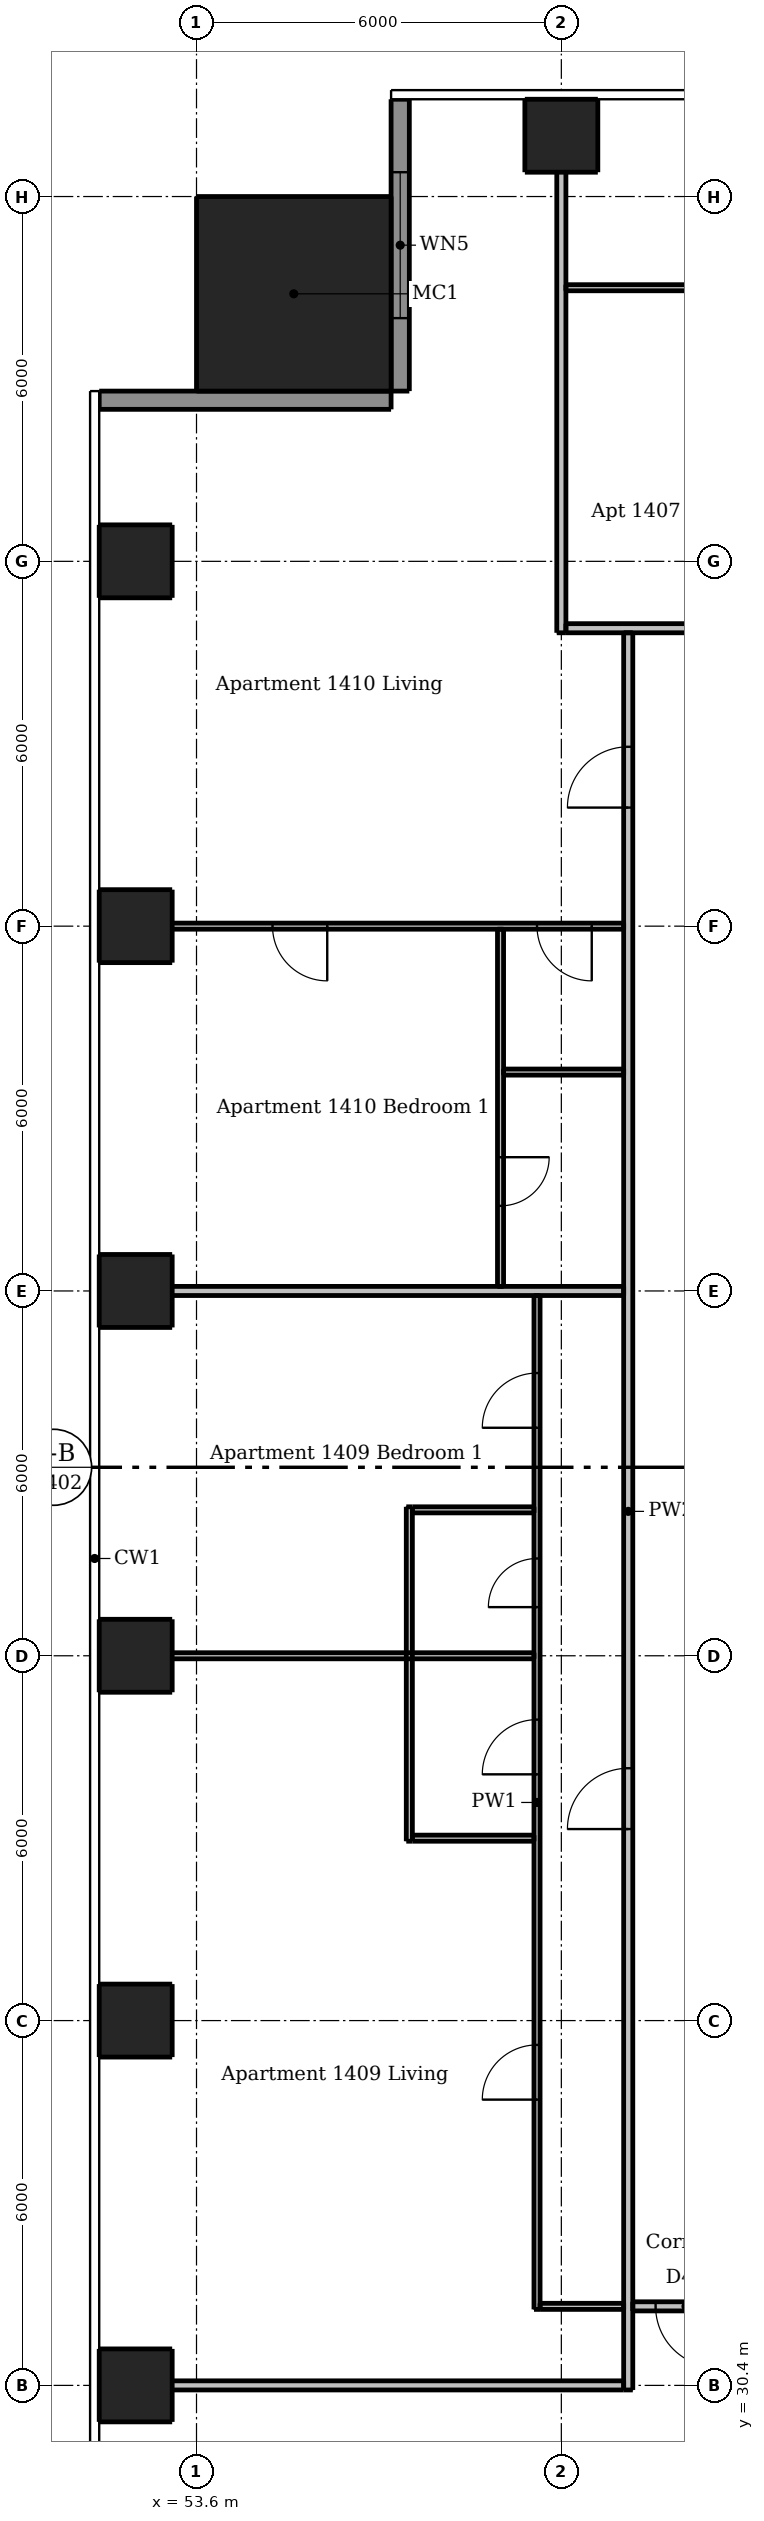
"""IFC4 building model, lengths in metres.
Left out: names, types, materials, properties, quantities, classifications, styles, units other than length and angle.
Written with IfcOpenShell. Run it as: python <this file> out.ifc"""

import sys

from ifc_helpers import new_model, si_unit, direction, frame, frame_2d, origin, origin_2d, place, context, subcontext, project, spatial, rectangle, extrude, element, fill, save


model = new_model("IFC4")
c1 = context("Model", 3, precision=1e-05, world=origin(), true_north=direction((0.0, 1.0)))
c2 = subcontext(c1, "Body", "Model", "MODEL_VIEW")
j1 = project(units=[si_unit("LENGTHUNIT", "METRE"), si_unit("PLANEANGLEUNIT", "RADIAN")], contexts=[c1])
p1 = place(None, origin())
s1 = spatial("IfcSite", under=j1, at=p1, CompositionType="ELEMENT")
p2 = place(p1, origin())
s2 = spatial("IfcBuilding", under=s1, at=p2, CompositionType="ELEMENT")
p3 = place(p2, frame((0.0, 0.0, 53.2)))
s3 = spatial("IfcBuildingStorey", under=s2, at=p3, CompositionType="ELEMENT", Elevation=53.2)
for number, where, z_axis, x_axis in (
    (1, (59.6, 67.4, 0.0), (0.0, 0.0, 1.0), (1.0, 0.0, 0.0)),
    (2, (52.6, 30.4, 0.0), (0.0, 0.0, 1.0), (1.0, 0.0, 0.0)),
    (3, (52.6, 36.4, 0.0), (0.0, 0.0, 1.0), (1.0, 0.0, 0.0)),
    (4, (52.6, 42.4, 0.0), (0.0, 0.0, 1.0), (1.0, 0.0, 0.0)),
    (5, (52.6, 48.4, 0.0), (0.0, 0.0, 1.0), (1.0, 0.0, 0.0)),
    (6, (52.6, 54.4, 0.0), (0.0, 0.0, 1.0), (1.0, 0.0, 0.0)),
    (7, (52.6, 60.4, 0.0), (0.0, 0.0, 1.0), (1.0, 0.0, 0.0)),
):
    element("IfcColumn", number, at=place(p3, frame(where, z_axis=z_axis, x_axis=x_axis)), inside=s3, PredefinedType="COLUMN", context=c2, shape_type="SweptSolid", body=[
        extrude(rectangle(XDim=1.2, YDim=1.2, at=origin_2d()), origin(), (0.0, 0.0, 1.0), 3.05),
    ])
p4 = place(p3, frame((55.2, 64.8, 0.0), z_axis=(0.0, 0.0, 1.0), x_axis=(1.0, 0.0, 0.0)))
e8 = element("IfcColumn", 8, at=p4, inside=s3, PredefinedType="COLUMN", context=c2, shape_type="SweptSolid", body=[
    extrude(rectangle(XDim=3.2, YDim=3.2, at=origin_2d()), origin(), (0.0, 0.0, 1.0), 3.3),
])
p5 = place(p3, frame((56.95, 68.0, 0.0), z_axis=(0.0, 0.0, 1.0), x_axis=(0.0, -1.0, 0.0)))
e9 = element("IfcWall", 9, at=p5, inside=s3, PredefinedType="SOLIDWALL", context=c2, shape_type="SweptSolid", body=[
    extrude(rectangle(XDim=4.8, YDim=0.3, at=frame_2d((2.4, 0.0))), origin(), (0.0, 0.0, 1.0), 3.05),
])
p6 = place(p5, frame((1.2, 0.0, 0.15)))
e10 = element("IfcOpeningElement", 10, at=p6, cuts=e9, PredefinedType="OPENING", context=c2, shape_type="SweptSolid", body=[
    extrude(rectangle(XDim=2.4, YDim=2.1, at=frame_2d((1.2, 1.05))), frame((0.0, 0.16, 0.0), z_axis=(0.0, -1.0, 0.0), x_axis=(1.0, 0.0, 0.0)), (0.0, 0.0, 1.0), 0.32),
])
p7 = place(p3, frame((56.8, 63.05, 0.0), z_axis=(0.0, 0.0, 1.0), x_axis=(-1.0, 0.0, 0.0)))
e11 = element("IfcWall", 11, at=p7, inside=s3, PredefinedType="SOLIDWALL", context=c2, shape_type="SweptSolid", body=[
    extrude(rectangle(XDim=4.8, YDim=0.3, at=frame_2d((2.4, 0.0))), origin(), (0.0, 0.0, 1.0), 3.05),
])
p8 = place(p3, frame((57.1, 39.35, 0.0), z_axis=(0.0, 0.0, 1.0), x_axis=(0.0, 1.0, 0.0)))
e12 = element("IfcWall", 12, at=p8, inside=s3, PredefinedType="PARTITIONING", context=c2, shape_type="SweptSolid", body=[
    extrude(rectangle(XDim=5.5, YDim=0.1, at=frame_2d((2.75, 0.0))), origin(), (0.0, 0.0, 1.0), 3.05),
])
p9 = place(p3, frame((58.6, 54.35, 0.0), z_axis=(0.0, 0.0, 1.0), x_axis=(0.0, -1.0, 0.0)))
e13 = element("IfcWall", 13, at=p9, inside=s3, PredefinedType="PARTITIONING", context=c2, shape_type="SweptSolid", body=[
    extrude(rectangle(XDim=5.875, YDim=0.1, at=frame_2d((2.938, 0.0))), origin(), (0.0, 0.0, 1.0), 3.05),
])
p10 = place(p9, frame((3.75, 0.0, 0.0)))
e14 = element("IfcOpeningElement", 14, at=p10, cuts=e13, PredefinedType="OPENING", context=c2, shape_type="SweptSolid", body=[
    extrude(rectangle(XDim=0.8, YDim=2.1, at=frame_2d((0.4, 1.05))), frame((0.0, 0.06, 0.0), z_axis=(0.0, -1.0, 0.0), x_axis=(1.0, 0.0, 0.0)), (0.0, 0.0, 1.0), 0.12),
])
p11 = place(p3, frame((59.2, 31.65, 0.0), z_axis=(0.0, 0.0, 1.0), x_axis=(0.0, 1.0, 0.0)))
e15 = element("IfcWall", 15, at=p11, inside=s3, PredefinedType="PARTITIONING", context=c2, shape_type="SweptSolid", body=[
    extrude(rectangle(XDim=16.675, YDim=0.1, at=frame_2d((8.337, 0.0))), origin(), (0.0, 0.0, 1.0), 3.05),
])
p12 = place(p11, frame((3.45, 0.0, 0.0)))
e16 = element("IfcOpeningElement", 16, at=p12, cuts=e15, PredefinedType="OPENING", context=c2, shape_type="SweptSolid", body=[
    extrude(rectangle(XDim=0.9, YDim=2.1, at=frame_2d((0.45, 1.05))), frame((0.0, 0.06, 0.0), z_axis=(0.0, -1.0, 0.0), x_axis=(1.0, 0.0, 0.0)), (0.0, 0.0, 1.0), 0.12),
])
p13 = place(p11, frame((8.8, 0.0, 0.0)))
e17 = element("IfcOpeningElement", 17, at=p13, cuts=e15, PredefinedType="OPENING", context=c2, shape_type="SweptSolid", body=[
    extrude(rectangle(XDim=0.9, YDim=2.1, at=frame_2d((0.45, 1.05))), frame((0.0, 0.06, 0.0), z_axis=(0.0, -1.0, 0.0), x_axis=(1.0, 0.0, 0.0)), (0.0, 0.0, 1.0), 0.12),
])
p14 = place(p11, frame((14.5, 0.0, 0.0)))
e18 = element("IfcOpeningElement", 18, at=p14, cuts=e15, PredefinedType="OPENING", context=c2, shape_type="SweptSolid", body=[
    extrude(rectangle(XDim=0.9, YDim=2.1, at=frame_2d((0.45, 1.05))), frame((0.0, 0.06, 0.0), z_axis=(0.0, -1.0, 0.0), x_axis=(1.0, 0.0, 0.0)), (0.0, 0.0, 1.0), 0.12),
])
p15 = place(p11, frame((11.55, 0.0, 0.0)))
e19 = element("IfcOpeningElement", 19, at=p15, cuts=e15, PredefinedType="OPENING", context=c2, shape_type="SweptSolid", body=[
    extrude(rectangle(XDim=0.8, YDim=2.1, at=frame_2d((0.4, 1.05))), frame((0.0, 0.06, 0.0), z_axis=(0.0, -1.0, 0.0), x_axis=(1.0, 0.0, 0.0)), (0.0, 0.0, 1.0), 0.12),
])
p16 = place(p3, frame((59.675, 64.9, 0.0), z_axis=(0.0, 0.0, 1.0), x_axis=(1.0, 0.0, 0.0)))
e20 = element("IfcWall", 20, at=p16, inside=s3, PredefinedType="PARTITIONING", context=c2, shape_type="SweptSolid", body=[
    extrude(rectangle(XDim=2.875, YDim=0.1, at=frame_2d((1.438, 0.0))), origin(), (0.0, 0.0, 1.0), 3.05),
])
p17 = place(p3, frame((60.625, 54.4, 0.0), z_axis=(0.0, 0.0, 1.0), x_axis=(-1.0, 0.0, 0.0)))
e21 = element("IfcWall", 21, at=p17, inside=s3, PredefinedType="PARTITIONING", context=c2, shape_type="SweptSolid", body=[
    extrude(rectangle(XDim=8.625, YDim=0.1, at=frame_2d((4.312, 0.0))), origin(), (0.0, 0.0, 1.0), 2.516),
])
p18 = place(p17, frame((0.525, 0.0, 0.0)))
e22 = element("IfcOpeningElement", 22, at=p18, cuts=e21, PredefinedType="OPENING", context=c2, shape_type="SweptSolid", body=[
    extrude(rectangle(XDim=0.9, YDim=2.1, at=frame_2d((0.45, 1.05))), frame((0.0, 0.06, 0.0), z_axis=(0.0, -1.0, 0.0), x_axis=(1.0, 0.0, 0.0)), (0.0, 0.0, 1.0), 0.12),
])
p19 = place(p17, frame((4.875, 0.0, 0.0)))
e23 = element("IfcOpeningElement", 23, at=p19, cuts=e21, PredefinedType="OPENING", context=c2, shape_type="SweptSolid", body=[
    extrude(rectangle(XDim=0.9, YDim=2.1, at=frame_2d((0.45, 1.05))), frame((0.0, 0.06, 0.0), z_axis=(0.0, -1.0, 0.0), x_axis=(1.0, 0.0, 0.0)), (0.0, 0.0, 1.0), 0.12),
])
p20 = place(p3, frame((58.65, 52.0, 0.0), z_axis=(0.0, 0.0, 1.0), x_axis=(1.0, 0.0, 0.0)))
e24 = element("IfcWall", 24, at=p20, inside=s3, PredefinedType="PARTITIONING", context=c2, shape_type="SweptSolid", body=[
    extrude(rectangle(XDim=1.975, YDim=0.1, at=frame_2d((0.988, 0.0))), origin(), (0.0, 0.0, 1.0), 3.05),
])
p21 = place(p3, frame((57.15, 44.8, 0.0), z_axis=(0.0, 0.0, 1.0), x_axis=(1.0, 0.0, 0.0)))
e25 = element("IfcWall", 25, at=p21, inside=s3, PredefinedType="PARTITIONING", context=c2, shape_type="SweptSolid", body=[
    extrude(rectangle(XDim=2.0, YDim=0.1, at=frame_2d((1.0, 0.0))), origin(), (0.0, 0.0, 1.0), 3.05),
])
p22 = place(p3, frame((52.0, 42.4, 0.0), z_axis=(0.0, 0.0, 1.0), x_axis=(1.0, 0.0, 0.0)))
e26 = element("IfcWall", 26, at=p22, inside=s3, PredefinedType="PARTITIONING", context=c2, shape_type="SweptSolid", body=[
    extrude(rectangle(XDim=7.15, YDim=0.1, at=frame_2d((3.575, 0.0))), origin(), (0.0, 0.0, 1.0), 2.516),
])
p23 = place(p3, frame((57.15, 39.4, 0.0), z_axis=(0.0, 0.0, 1.0), x_axis=(1.0, 0.0, 0.0)))
e27 = element("IfcWall", 27, at=p23, inside=s3, PredefinedType="PARTITIONING", context=c2, shape_type="SweptSolid", body=[
    extrude(rectangle(XDim=2.0, YDim=0.1, at=frame_2d((1.0, 0.0))), origin(), (0.0, 0.0, 1.0), 3.05),
])
p24 = place(p3, frame((59.25, 31.7, 0.0), z_axis=(0.0, 0.0, 1.0), x_axis=(1.0, 0.0, 0.0)))
e28 = element("IfcWall", 28, at=p24, inside=s3, PredefinedType="PARTITIONING", context=c2, shape_type="SweptSolid", body=[
    extrude(rectangle(XDim=1.375, YDim=0.1, at=frame_2d((0.688, 0.0))), origin(), (0.0, 0.0, 1.0), 3.05),
])
p25 = place(p3, frame((59.6, 59.225, 0.0), z_axis=(0.0, 0.0, 1.0), x_axis=(0.0, 1.0, 0.0)))
e29 = element("IfcWall", 29, at=p25, inside=s3, PredefinedType="PARTITIONING", context=c2, shape_type="SweptSolid", body=[
    extrude(rectangle(XDim=8.775, YDim=0.15, at=frame_2d((4.387, 0.0))), origin(), (0.0, 0.0, 1.0), 2.51),
])
p26 = place(p3, frame((60.7, 30.325, 0.0), z_axis=(0.0, 0.0, 1.0), x_axis=(0.0, 1.0, 0.0)))
e30 = element("IfcWall", 30, at=p26, inside=s3, PredefinedType="PARTITIONING", context=c2, shape_type="SweptSolid", body=[
    extrude(rectangle(XDim=28.9, YDim=0.15, at=frame_2d((14.45, 0.0))), origin(), (0.0, 0.0, 1.0), 3.05),
])
p27 = place(p26, frame((9.225, 0.0, 0.0)))
e31 = element("IfcOpeningElement", 31, at=p27, cuts=e30, PredefinedType="OPENING", context=c2, shape_type="SweptSolid", body=[
    extrude(rectangle(XDim=1.0, YDim=2.1, at=frame_2d((0.5, 1.05))), frame((0.0, 0.085, 0.0), z_axis=(0.0, -1.0, 0.0), x_axis=(1.0, 0.0, 0.0)), (0.0, 0.0, 1.0), 0.17),
])
p28 = place(p26, frame((26.025, 0.0, 0.0)))
e32 = element("IfcOpeningElement", 32, at=p28, cuts=e30, PredefinedType="OPENING", context=c2, shape_type="SweptSolid", body=[
    extrude(rectangle(XDim=1.0, YDim=2.1, at=frame_2d((0.5, 1.05))), frame((0.0, 0.085, 0.0), z_axis=(0.0, -1.0, 0.0), x_axis=(1.0, 0.0, 0.0)), (0.0, 0.0, 1.0), 0.17),
])
p29 = place(p3, frame((59.675, 59.3, 0.0), z_axis=(0.0, 0.0, 1.0), x_axis=(1.0, 0.0, 0.0)))
e33 = element("IfcWall", 33, at=p29, inside=s3, PredefinedType="PARTITIONING", context=c2, shape_type="SweptSolid", body=[
    extrude(rectangle(XDim=28.55, YDim=0.15, at=frame_2d((14.275, 0.0))), origin(), (0.0, 0.0, 1.0), 3.05),
])
p30 = place(p29, frame((6.925, 0.0, 0.0)))
e34 = element("IfcOpeningElement", 34, at=p30, cuts=e33, PredefinedType="OPENING", context=c2, shape_type="SweptSolid", body=[
    extrude(rectangle(XDim=1.0, YDim=2.1, at=frame_2d((0.5, 1.05))), frame((0.0, 0.085, 0.0), z_axis=(0.0, -1.0, 0.0), x_axis=(1.0, 0.0, 0.0)), (0.0, 0.0, 1.0), 0.17),
])
p31 = place(p29, frame((25.775, 0.0, 0.0)))
e35 = element("IfcOpeningElement", 35, at=p31, cuts=e33, PredefinedType="OPENING", context=c2, shape_type="SweptSolid", body=[
    extrude(rectangle(XDim=1.0, YDim=2.1, at=frame_2d((0.5, 1.05))), frame((0.0, 0.085, 0.0), z_axis=(0.0, -1.0, 0.0), x_axis=(1.0, 0.0, 0.0)), (0.0, 0.0, 1.0), 0.17),
])
p32 = place(p3, frame((52.0, 48.4, 0.0), z_axis=(0.0, 0.0, 1.0), x_axis=(1.0, 0.0, 0.0)))
e36 = element("IfcWall", 36, at=p32, inside=s3, PredefinedType="PARTITIONING", context=c2, shape_type="SweptSolid", body=[
    extrude(rectangle(XDim=8.625, YDim=0.15, at=frame_2d((4.312, 0.0))), origin(), (0.0, 0.0, 1.0), 2.516),
])
p33 = place(p3, frame((89.525, 31.7, 0.0), z_axis=(0.0, 0.0, 1.0), x_axis=(-1.0, 0.0, 0.0)))
e37 = element("IfcWall", 37, at=p33, inside=s3, PredefinedType="PARTITIONING", context=c2, shape_type="SweptSolid", body=[
    extrude(rectangle(XDim=28.75, YDim=0.15, at=frame_2d((14.375, 0.0))), origin(), (0.0, 0.0, 1.0), 3.05),
])
p34 = place(p33, frame((27.375, 0.0, 0.0)))
e38 = element("IfcOpeningElement", 38, at=p34, cuts=e37, PredefinedType="OPENING", context=c2, shape_type="SweptSolid", body=[
    extrude(rectangle(XDim=1.0, YDim=2.1, at=frame_2d((0.5, 1.05))), frame((0.0, 0.085, 0.0), z_axis=(0.0, -1.0, 0.0), x_axis=(1.0, 0.0, 0.0)), (0.0, 0.0, 1.0), 0.17),
])
p35 = place(p33, frame((12.625, 0.0, 0.0)))
e39 = element("IfcOpeningElement", 39, at=p35, cuts=e37, PredefinedType="OPENING", context=c2, shape_type="SweptSolid", body=[
    extrude(rectangle(XDim=1.0, YDim=2.1, at=frame_2d((0.5, 1.05))), frame((0.0, 0.085, 0.0), z_axis=(0.0, -1.0, 0.0), x_axis=(1.0, 0.0, 0.0)), (0.0, 0.0, 1.0), 0.17),
])
p36 = place(p33, frame((4.225, 0.0, 0.0)))
e40 = element("IfcOpeningElement", 40, at=p36, cuts=e37, PredefinedType="OPENING", context=c2, shape_type="SweptSolid", body=[
    extrude(rectangle(XDim=1.0, YDim=2.1, at=frame_2d((0.5, 1.05))), frame((0.0, 0.085, 0.0), z_axis=(0.0, -1.0, 0.0), x_axis=(1.0, 0.0, 0.0)), (0.0, 0.0, 1.0), 0.17),
])
p37 = place(p3, frame((52.0, 30.4, 0.0), z_axis=(0.0, 0.0, 1.0), x_axis=(1.0, 0.0, 0.0)))
e41 = element("IfcWall", 41, at=p37, inside=s3, PredefinedType="PARTITIONING", context=c2, shape_type="SweptSolid", body=[
    extrude(rectangle(XDim=8.625, YDim=0.15, at=frame_2d((4.312, 0.0))), origin(), (0.0, 0.0, 1.0), 2.647),
])
p38 = place(p6, origin())
e42 = element("IfcWindow", 42, at=p38, inside=s3, PartitioningType="DOUBLE_PANEL_VERTICAL", PredefinedType="WINDOW", context=c2, shape_type="SweptSolid", body=[
    extrude(rectangle(XDim=2.4, YDim=2.1, at=frame_2d((1.2, 1.05))), frame((0.0, 0.03, 0.0), z_axis=(0.0, -1.0, 0.0), x_axis=(1.0, 0.0, 0.0)), (0.0, 0.0, 1.0), 0.06),
])
fill(e10, e42)
p39 = place(p34, origin())
e43 = element("IfcDoor", 43, at=p39, inside=s3, OperationType="SINGLE_SWING_LEFT", PredefinedType="DOOR", context=c2, shape_type="SweptSolid", body=[
    extrude(rectangle(XDim=1.0, YDim=2.1, at=frame_2d((0.5, 1.05))), frame((0.0, 0.025, 0.0), z_axis=(0.0, -1.0, 0.0), x_axis=(1.0, 0.0, 0.0)), (0.0, 0.0, 1.0), 0.05),
])
fill(e38, e43)
p40 = place(p27, origin())
e44 = element("IfcDoor", 44, at=p40, inside=s3, OperationType="SINGLE_SWING_LEFT", PredefinedType="DOOR", context=c2, shape_type="SweptSolid", body=[
    extrude(rectangle(XDim=1.0, YDim=2.1, at=frame_2d((0.5, 1.05))), frame((0.0, 0.025, 0.0), z_axis=(0.0, -1.0, 0.0), x_axis=(1.0, 0.0, 0.0)), (0.0, 0.0, 1.0), 0.05),
])
fill(e31, e44)
p41 = place(p12, origin())
e45 = element("IfcDoor", 45, at=p41, inside=s3, OperationType="SINGLE_SWING_LEFT", PredefinedType="DOOR", context=c2, shape_type="SweptSolid", body=[
    extrude(rectangle(XDim=0.9, YDim=2.1, at=frame_2d((0.45, 1.05))), frame((0.0, 0.025, 0.0), z_axis=(0.0, -1.0, 0.0), x_axis=(1.0, 0.0, 0.0)), (0.0, 0.0, 1.0), 0.05),
])
fill(e16, e45)
p42 = place(p13, origin())
e46 = element("IfcDoor", 46, at=p42, inside=s3, OperationType="SINGLE_SWING_LEFT", PredefinedType="DOOR", context=c2, shape_type="SweptSolid", body=[
    extrude(rectangle(XDim=0.9, YDim=2.1, at=frame_2d((0.45, 1.05))), frame((0.0, 0.025, 0.0), z_axis=(0.0, -1.0, 0.0), x_axis=(1.0, 0.0, 0.0)), (0.0, 0.0, 1.0), 0.05),
])
fill(e17, e46)
p43 = place(p14, origin())
e47 = element("IfcDoor", 47, at=p43, inside=s3, OperationType="SINGLE_SWING_LEFT", PredefinedType="DOOR", context=c2, shape_type="SweptSolid", body=[
    extrude(rectangle(XDim=0.9, YDim=2.1, at=frame_2d((0.45, 1.05))), frame((0.0, 0.025, 0.0), z_axis=(0.0, -1.0, 0.0), x_axis=(1.0, 0.0, 0.0)), (0.0, 0.0, 1.0), 0.05),
])
fill(e18, e47)
p44 = place(p15, origin())
e48 = element("IfcDoor", 48, at=p44, inside=s3, OperationType="SINGLE_SWING_LEFT", PredefinedType="DOOR", context=c2, shape_type="SweptSolid", body=[
    extrude(rectangle(XDim=0.8, YDim=2.1, at=frame_2d((0.4, 1.05))), frame((0.0, 0.025, 0.0), z_axis=(0.0, -1.0, 0.0), x_axis=(1.0, 0.0, 0.0)), (0.0, 0.0, 1.0), 0.05),
])
fill(e19, e48)
p45 = place(p28, origin())
e49 = element("IfcDoor", 49, at=p45, inside=s3, OperationType="SINGLE_SWING_LEFT", PredefinedType="DOOR", context=c2, shape_type="SweptSolid", body=[
    extrude(rectangle(XDim=1.0, YDim=2.1, at=frame_2d((0.5, 1.05))), frame((0.0, 0.025, 0.0), z_axis=(0.0, -1.0, 0.0), x_axis=(1.0, 0.0, 0.0)), (0.0, 0.0, 1.0), 0.05),
])
fill(e32, e49)
p46 = place(p18, origin())
e50 = element("IfcDoor", 50, at=p46, inside=s3, OperationType="SINGLE_SWING_LEFT", PredefinedType="DOOR", context=c2, shape_type="SweptSolid", body=[
    extrude(rectangle(XDim=0.9, YDim=2.1, at=frame_2d((0.45, 1.05))), frame((0.0, 0.025, 0.0), z_axis=(0.0, -1.0, 0.0), x_axis=(1.0, 0.0, 0.0)), (0.0, 0.0, 1.0), 0.05),
])
fill(e22, e50)
p47 = place(p19, origin())
e51 = element("IfcDoor", 51, at=p47, inside=s3, OperationType="SINGLE_SWING_LEFT", PredefinedType="DOOR", context=c2, shape_type="SweptSolid", body=[
    extrude(rectangle(XDim=0.9, YDim=2.1, at=frame_2d((0.45, 1.05))), frame((0.0, 0.025, 0.0), z_axis=(0.0, -1.0, 0.0), x_axis=(1.0, 0.0, 0.0)), (0.0, 0.0, 1.0), 0.05),
])
fill(e23, e51)
p48 = place(p10, origin())
e52 = element("IfcDoor", 52, at=p48, inside=s3, OperationType="SINGLE_SWING_LEFT", PredefinedType="DOOR", context=c2, shape_type="SweptSolid", body=[
    extrude(rectangle(XDim=0.8, YDim=2.1, at=frame_2d((0.4, 1.05))), frame((0.0, 0.025, 0.0), z_axis=(0.0, -1.0, 0.0), x_axis=(1.0, 0.0, 0.0)), (0.0, 0.0, 1.0), 0.05),
])
fill(e14, e52)
save(model, sys.argv[1])
